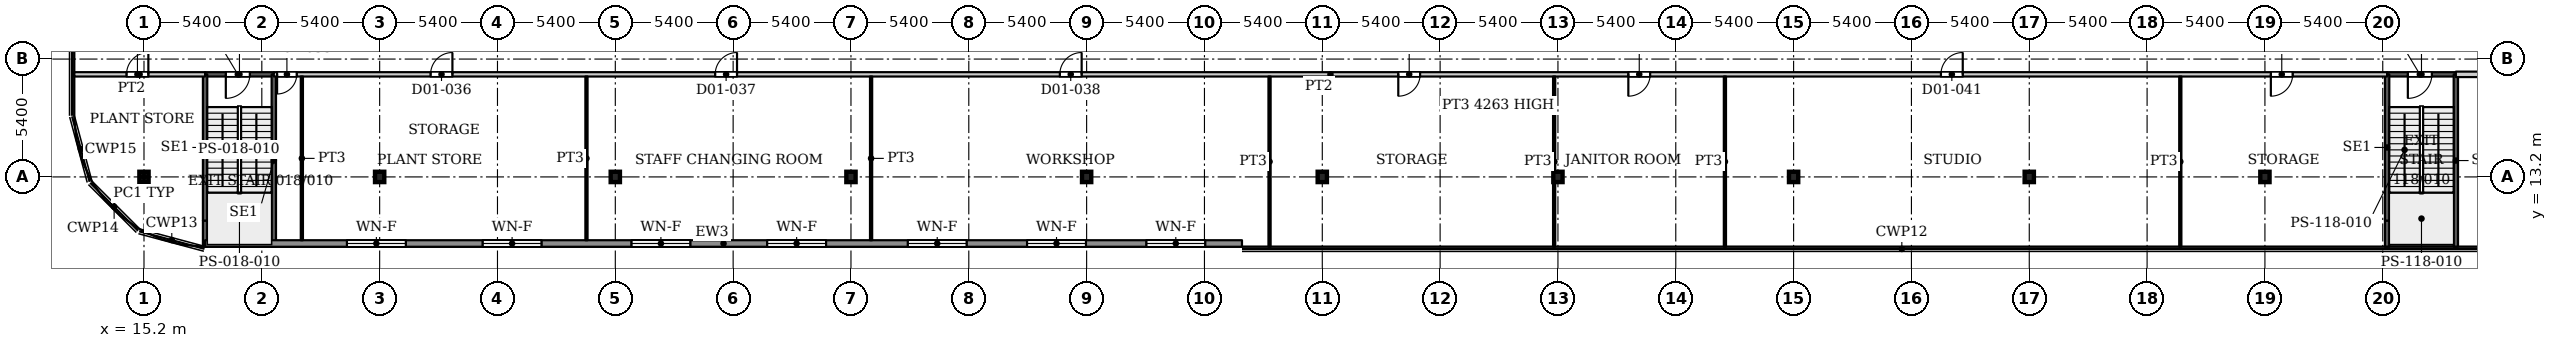
"""IFC4 building model, lengths in metres.
Left out: names, types, materials, properties, quantities, classifications, styles, units other than length and angle.
Written with IfcOpenShell. Run it as: python <this file> out.ifc"""

import sys

from ifc_helpers import new_model, si_unit, direction, frame, frame_2d, origin, origin_2d, place, context, subcontext, project, spatial, rectangle, i_section, extrude, source, transform, mapped, element, fill, save


model = new_model("IFC4")
c1 = context("Model", 3, precision=1e-05, world=origin(), true_north=direction((0.0, 1.0)))
c2 = subcontext(c1, "Body", "Model", "MODEL_VIEW")
j1 = project(units=[si_unit("LENGTHUNIT", "METRE"), si_unit("PLANEANGLEUNIT", "RADIAN")], contexts=[c1])
p1 = place(None, origin())
s1 = spatial("IfcSite", under=j1, at=p1, CompositionType="ELEMENT")
p2 = place(p1, origin())
s2 = spatial("IfcBuilding", under=s1, at=p2, CompositionType="ELEMENT")
p3 = place(p2, frame((0.0, 0.0, 7.5)))
s3 = spatial("IfcBuildingStorey", under=s2, at=p3, CompositionType="ELEMENT", Elevation=7.5)
for number, where, z_axis, x_axis in (
    (1, (15.2, 13.2, 0.0), (0.0, 0.0, 1.0), (1.0, 0.0, 0.0)),
    (2, (26.0, 13.2, 0.0), (0.0, 0.0, 1.0), (1.0, 0.0, 0.0)),
    (3, (36.8, 13.2, 0.0), (0.0, 0.0, 1.0), (1.0, 0.0, 0.0)),
    (4, (47.6, 13.2, 0.0), (0.0, 0.0, 1.0), (1.0, 0.0, 0.0)),
    (5, (58.4, 13.2, 0.0), (0.0, 0.0, 1.0), (1.0, 0.0, 0.0)),
    (6, (69.2, 13.2, 0.0), (0.0, 0.0, 1.0), (1.0, 0.0, 0.0)),
    (7, (80.0, 13.2, 0.0), (0.0, 0.0, 1.0), (1.0, 0.0, 0.0)),
    (8, (90.8, 13.2, 0.0), (0.0, 0.0, 1.0), (1.0, 0.0, 0.0)),
    (9, (101.6, 13.2, 0.0), (0.0, 0.0, 1.0), (1.0, 0.0, 0.0)),
    (10, (112.4, 13.2, 0.0), (0.0, 0.0, 1.0), (1.0, 0.0, 0.0)),
):
    element("IfcColumn", number, at=place(p3, frame(where, z_axis=z_axis, x_axis=x_axis)), inside=s3, PredefinedType="COLUMN", context=c2, shape_type="SweptSolid", body=[
        extrude(i_section(OverallWidth=0.424, OverallDepth=0.474, WebThickness=0.048, FlangeThickness=0.077, FilletRadius=0.014, at=origin_2d()), origin(), (0.0, 0.0, 1.0), 5.0),
    ])
p4 = place(p3, frame((65.52, 10.15, 0.0), z_axis=(0.0, 0.0, 1.0), x_axis=(-1.0, 0.0, 0.0)))
e11 = element("IfcWall", 11, at=p4, inside=s3, PredefinedType="SOLIDWALL", context=c2, shape_type="SweptSolid", body=[
    extrude(rectangle(XDim=47.52, YDim=0.3, at=frame_2d((23.76, 0.0))), origin(), (0.0, 0.0, 1.0), 4.75),
])
p5 = place(p4, frame((1.683, 0.0, 0.6)))
e12 = element("IfcOpeningElement", 12, at=p5, cuts=e11, PredefinedType="OPENING", context=c2, shape_type="SweptSolid", body=[
    extrude(rectangle(XDim=2.7, YDim=3.0, at=frame_2d((1.35, 1.5))), frame((0.0, 0.16, 0.0), z_axis=(0.0, -1.0, 0.0), x_axis=(1.0, 0.0, 0.0)), (0.0, 0.0, 1.0), 0.32),
])
p6 = place(p4, frame((7.15, 0.0, 0.6)))
e13 = element("IfcOpeningElement", 13, at=p6, cuts=e11, PredefinedType="OPENING", context=c2, shape_type="SweptSolid", body=[
    extrude(rectangle(XDim=2.7, YDim=3.0, at=frame_2d((1.35, 1.5))), frame((0.0, 0.16, 0.0), z_axis=(0.0, -1.0, 0.0), x_axis=(1.0, 0.0, 0.0)), (0.0, 0.0, 1.0), 0.32),
])
p7 = place(p4, frame((12.617, 0.0, 0.6)))
e14 = element("IfcOpeningElement", 14, at=p7, cuts=e11, PredefinedType="OPENING", context=c2, shape_type="SweptSolid", body=[
    extrude(rectangle(XDim=2.7, YDim=3.0, at=frame_2d((1.35, 1.5))), frame((0.0, 0.16, 0.0), z_axis=(0.0, -1.0, 0.0), x_axis=(1.0, 0.0, 0.0)), (0.0, 0.0, 1.0), 0.32),
])
p8 = place(p4, frame((19.06, 0.0, 0.6)))
e15 = element("IfcOpeningElement", 15, at=p8, cuts=e11, PredefinedType="OPENING", context=c2, shape_type="SweptSolid", body=[
    extrude(rectangle(XDim=2.7, YDim=3.0, at=frame_2d((1.35, 1.5))), frame((0.0, 0.16, 0.0), z_axis=(0.0, -1.0, 0.0), x_axis=(1.0, 0.0, 0.0)), (0.0, 0.0, 1.0), 0.32),
])
p9 = place(p4, frame((25.28, 0.0, 0.6)))
e16 = element("IfcOpeningElement", 16, at=p9, cuts=e11, PredefinedType="OPENING", context=c2, shape_type="SweptSolid", body=[
    extrude(rectangle(XDim=2.7, YDim=3.0, at=frame_2d((1.35, 1.5))), frame((0.0, 0.16, 0.0), z_axis=(0.0, -1.0, 0.0), x_axis=(1.0, 0.0, 0.0)), (0.0, 0.0, 1.0), 0.32),
])
p10 = place(p4, frame((32.1, 0.0, 0.6)))
e17 = element("IfcOpeningElement", 17, at=p10, cuts=e11, PredefinedType="OPENING", context=c2, shape_type="SweptSolid", body=[
    extrude(rectangle(XDim=2.7, YDim=3.0, at=frame_2d((1.35, 1.5))), frame((0.0, 0.16, 0.0), z_axis=(0.0, -1.0, 0.0), x_axis=(1.0, 0.0, 0.0)), (0.0, 0.0, 1.0), 0.32),
])
p11 = place(p4, frame((38.32, 0.0, 0.6)))
e18 = element("IfcOpeningElement", 18, at=p11, cuts=e11, PredefinedType="OPENING", context=c2, shape_type="SweptSolid", body=[
    extrude(rectangle(XDim=2.7, YDim=3.0, at=frame_2d((1.35, 1.5))), frame((0.0, 0.16, 0.0), z_axis=(0.0, -1.0, 0.0), x_axis=(1.0, 0.0, 0.0)), (0.0, 0.0, 1.0), 0.32),
])
p12 = place(p3, frame((18.0, 17.9, 0.0), z_axis=(0.0, 0.0, 1.0), x_axis=(1.0, 0.0, 0.0)))
e19 = element("IfcWall", 19, at=p12, inside=s3, PredefinedType="SHEAR", context=c2, shape_type="SweptSolid", body=[
    extrude(rectangle(XDim=3.15, YDim=0.2, at=frame_2d((1.575, 0.0))), origin(), (0.0, 0.0, 1.0), 5.0),
])
p13 = place(p12, frame((0.95, 0.0, 0.0)))
e20 = element("IfcOpeningElement", 20, at=p13, cuts=e19, PredefinedType="OPENING", context=c2, shape_type="SweptSolid", body=[
    extrude(rectangle(XDim=1.1, YDim=2.2, at=frame_2d((0.55, 1.1))), frame((0.0, 0.11, 0.0), z_axis=(0.0, -1.0, 0.0), x_axis=(1.0, 0.0, 0.0)), (0.0, 0.0, 1.0), 0.22),
])
p14 = place(p3, frame((18.0, 10.0, 0.0), z_axis=(0.0, 0.0, 1.0), x_axis=(0.0, 1.0, 0.0)))
e21 = element("IfcWall", 21, at=p14, inside=s3, PredefinedType="SHEAR", context=c2, shape_type="SweptSolid", body=[
    extrude(rectangle(XDim=1.2, YDim=0.2, at=frame_2d((0.6, 0.0))), origin(), (0.0, 0.0, 1.0), 5.0),
])
p15 = place(p3, frame((18.0, 11.2, 0.0), z_axis=(0.0, 0.0, 1.0), x_axis=(0.0, 1.0, 0.0)))
e22 = element("IfcWall", 22, at=p15, inside=s3, PredefinedType="SHEAR", context=c2, shape_type="SweptSolid", body=[
    extrude(rectangle(XDim=6.7, YDim=0.2, at=frame_2d((3.35, 0.0))), origin(), (0.0, 0.0, 1.0), 5.0),
])
p16 = place(p3, frame((21.15, 10.0, 0.0), z_axis=(0.0, 0.0, 1.0), x_axis=(0.0, 1.0, 0.0)))
e23 = element("IfcWall", 23, at=p16, inside=s3, PredefinedType="SHEAR", context=c2, shape_type="SweptSolid", body=[
    extrude(rectangle(XDim=7.9, YDim=0.2, at=frame_2d((3.95, 0.0))), origin(), (0.0, 0.0, 1.0), 5.0),
])
p17 = place(p3, frame((118.0, 17.9, 0.0), z_axis=(0.0, 0.0, 1.0), x_axis=(1.0, 0.0, 0.0)))
e24 = element("IfcWall", 24, at=p17, inside=s3, PredefinedType="SHEAR", context=c2, shape_type="SweptSolid", body=[
    extrude(rectangle(XDim=3.15, YDim=0.2, at=frame_2d((1.575, 0.0))), origin(), (0.0, 0.0, 1.0), 5.0),
])
p18 = place(p17, frame((0.95, 0.0, 0.0)))
e25 = element("IfcOpeningElement", 25, at=p18, cuts=e24, PredefinedType="OPENING", context=c2, shape_type="SweptSolid", body=[
    extrude(rectangle(XDim=1.1, YDim=2.2, at=frame_2d((0.55, 1.1))), frame((0.0, 0.11, 0.0), z_axis=(0.0, -1.0, 0.0), x_axis=(1.0, 0.0, 0.0)), (0.0, 0.0, 1.0), 0.22),
])
p19 = place(p3, frame((118.0, 10.0, 0.0), z_axis=(0.0, 0.0, 1.0), x_axis=(0.0, 1.0, 0.0)))
e26 = element("IfcWall", 26, at=p19, inside=s3, PredefinedType="SHEAR", context=c2, shape_type="SweptSolid", body=[
    extrude(rectangle(XDim=1.2, YDim=0.2, at=frame_2d((0.6, 0.0))), origin(), (0.0, 0.0, 1.0), 5.0),
])
p20 = place(p3, frame((118.0, 11.2, 0.0), z_axis=(0.0, 0.0, 1.0), x_axis=(0.0, 1.0, 0.0)))
e27 = element("IfcWall", 27, at=p20, inside=s3, PredefinedType="SHEAR", context=c2, shape_type="SweptSolid", body=[
    extrude(rectangle(XDim=6.7, YDim=0.2, at=frame_2d((3.35, 0.0))), origin(), (0.0, 0.0, 1.0), 5.0),
])
p21 = place(p3, frame((121.15, 10.0, 0.0), z_axis=(0.0, 0.0, 1.0), x_axis=(0.0, 1.0, 0.0)))
e28 = element("IfcWall", 28, at=p21, inside=s3, PredefinedType="SHEAR", context=c2, shape_type="SweptSolid", body=[
    extrude(rectangle(XDim=7.9, YDim=0.2, at=frame_2d((3.95, 0.0))), origin(), (0.0, 0.0, 1.0), 5.0),
])
p22 = place(p3, frame((12.0, 17.9, 0.0), z_axis=(0.0, 0.0, 1.0), x_axis=(1.0, 0.0, 0.0)))
e29 = element("IfcWall", 29, at=p22, inside=s3, PredefinedType="PARTITIONING", context=c2, shape_type="SweptSolid", body=[
    extrude(rectangle(XDim=6.0, YDim=0.2, at=frame_2d((3.0, 0.0))), origin(), (0.0, 0.0, 1.0), 4.68),
])
p23 = place(p22, frame((2.4, 0.0, 0.0)))
e30 = element("IfcOpeningElement", 30, at=p23, cuts=e29, PredefinedType="OPENING", context=c2, shape_type="SweptSolid", body=[
    extrude(rectangle(XDim=1.0, YDim=2.1, at=frame_2d((0.5, 1.05))), frame((0.0, 0.11, 0.0), z_axis=(0.0, -1.0, 0.0), x_axis=(1.0, 0.0, 0.0)), (0.0, 0.0, 1.0), 0.22),
])
p24 = place(p3, frame((21.15, 17.9, 0.0), z_axis=(0.0, 0.0, 1.0), x_axis=(1.0, 0.0, 0.0)))
e31 = element("IfcWall", 31, at=p24, inside=s3, PredefinedType="PARTITIONING", context=c2, shape_type="SweptSolid", body=[
    extrude(rectangle(XDim=96.85, YDim=0.2, at=frame_2d((48.425, 0.0))), origin(), (0.0, 0.0, 1.0), 4.68),
])
p25 = place(p24, frame((0.15, 0.0, 0.0)))
e32 = element("IfcOpeningElement", 32, at=p25, cuts=e31, PredefinedType="OPENING", context=c2, shape_type="SweptSolid", body=[
    extrude(rectangle(XDim=0.9, YDim=2.1, at=frame_2d((0.45, 1.05))), frame((0.0, 0.11, 0.0), z_axis=(0.0, -1.0, 0.0), x_axis=(1.0, 0.0, 0.0)), (0.0, 0.0, 1.0), 0.22),
])
p26 = place(p24, frame((7.185, 0.0, 0.0)))
e33 = element("IfcOpeningElement", 33, at=p26, cuts=e31, PredefinedType="OPENING", context=c2, shape_type="SweptSolid", body=[
    extrude(rectangle(XDim=1.0, YDim=2.1, at=frame_2d((0.5, 1.05))), frame((0.0, 0.11, 0.0), z_axis=(0.0, -1.0, 0.0), x_axis=(1.0, 0.0, 0.0)), (0.0, 0.0, 1.0), 0.22),
])
p27 = place(p24, frame((20.228, 0.0, 0.0)))
e34 = element("IfcOpeningElement", 34, at=p27, cuts=e31, PredefinedType="OPENING", context=c2, shape_type="SweptSolid", body=[
    extrude(rectangle(XDim=1.0, YDim=2.1, at=frame_2d((0.5, 1.05))), frame((0.0, 0.11, 0.0), z_axis=(0.0, -1.0, 0.0), x_axis=(1.0, 0.0, 0.0)), (0.0, 0.0, 1.0), 0.22),
])
p28 = place(p24, frame((36.022, 0.0, 0.0)))
e35 = element("IfcOpeningElement", 35, at=p28, cuts=e31, PredefinedType="OPENING", context=c2, shape_type="SweptSolid", body=[
    extrude(rectangle(XDim=1.0, YDim=2.1, at=frame_2d((0.5, 1.05))), frame((0.0, 0.11, 0.0), z_axis=(0.0, -1.0, 0.0), x_axis=(1.0, 0.0, 0.0)), (0.0, 0.0, 1.0), 0.22),
])
p29 = place(p24, frame((51.533, 0.0, 0.0)))
e36 = element("IfcOpeningElement", 36, at=p29, cuts=e31, PredefinedType="OPENING", context=c2, shape_type="SweptSolid", body=[
    extrude(rectangle(XDim=1.0, YDim=2.1, at=frame_2d((0.5, 1.05))), frame((0.0, 0.11, 0.0), z_axis=(0.0, -1.0, 0.0), x_axis=(1.0, 0.0, 0.0)), (0.0, 0.0, 1.0), 0.22),
])
p30 = place(p24, frame((62.076, 0.0, 0.0)))
e37 = element("IfcOpeningElement", 37, at=p30, cuts=e31, PredefinedType="OPENING", context=c2, shape_type="SweptSolid", body=[
    extrude(rectangle(XDim=1.0, YDim=2.1, at=frame_2d((0.5, 1.05))), frame((0.0, 0.11, 0.0), z_axis=(0.0, -1.0, 0.0), x_axis=(1.0, 0.0, 0.0)), (0.0, 0.0, 1.0), 0.22),
])
p31 = place(p24, frame((76.402, 0.0, 0.0)))
e38 = element("IfcOpeningElement", 38, at=p31, cuts=e31, PredefinedType="OPENING", context=c2, shape_type="SweptSolid", body=[
    extrude(rectangle(XDim=1.0, YDim=2.1, at=frame_2d((0.5, 1.05))), frame((0.0, 0.11, 0.0), z_axis=(0.0, -1.0, 0.0), x_axis=(1.0, 0.0, 0.0)), (0.0, 0.0, 1.0), 0.22),
])
p32 = place(p24, frame((91.522, 0.0, 0.0)))
e39 = element("IfcOpeningElement", 39, at=p32, cuts=e31, PredefinedType="OPENING", context=c2, shape_type="SweptSolid", body=[
    extrude(rectangle(XDim=1.0, YDim=2.1, at=frame_2d((0.5, 1.05))), frame((0.0, 0.11, 0.0), z_axis=(0.0, -1.0, 0.0), x_axis=(1.0, 0.0, 0.0)), (0.0, 0.0, 1.0), 0.22),
])
for number, where, z_axis, x_axis in (
    (40, (22.435, 10.299, 0.0), (0.0, 0.0, 1.0), (0.0, 1.0, 0.0)),
    (41, (35.478, 10.299, 0.0), (0.0, 0.0, 1.0), (0.0, 1.0, 0.0)),
    (42, (48.522, 10.299, 0.0), (0.0, 0.0, 1.0), (0.0, 1.0, 0.0)),
):
    element("IfcWall", number, at=place(p3, frame(where, z_axis=z_axis, x_axis=x_axis)), inside=s3, PredefinedType="PARTITIONING", context=c2, shape_type="SweptSolid", body=[
        extrude(rectangle(XDim=7.501, YDim=0.1, at=frame_2d((3.75, 0.0))), origin(), (0.0, 0.0, 1.0), 4.68),
    ])
p33 = place(p3, frame((66.783, 10.0, 0.0), z_axis=(0.0, 0.0, 1.0), x_axis=(0.0, 1.0, 0.0)))
e43 = element("IfcWall", 43, at=p33, inside=s3, PredefinedType="PARTITIONING", context=c2, shape_type="SweptSolid", body=[
    extrude(rectangle(XDim=7.8, YDim=0.1, at=frame_2d((3.9, 0.0))), origin(), (0.0, 0.0, 1.0), 4.68),
])
p34 = place(p3, frame((79.826, 10.0, 0.0), z_axis=(0.0, 0.0, 1.0), x_axis=(0.0, 1.0, 0.0)))
e44 = element("IfcWall", 44, at=p34, inside=s3, PredefinedType="PARTITIONING", context=c2, shape_type="SweptSolid", body=[
    extrude(rectangle(XDim=7.8, YDim=0.1, at=frame_2d((3.9, 0.0))), origin(), (0.0, 0.0, 1.0), 4.263),
])
for number, where, z_axis, x_axis in (
    (45, (87.652, 10.0, 0.0), (0.0, 0.0, 1.0), (0.0, 1.0, 0.0)),
    (46, (108.522, 10.0, 0.0), (0.0, 0.0, 1.0), (0.0, 1.0, 0.0)),
):
    element("IfcWall", number, at=place(p3, frame(where, z_axis=z_axis, x_axis=x_axis)), inside=s3, PredefinedType="PARTITIONING", context=c2, shape_type="SweptSolid", body=[
        extrude(rectangle(XDim=7.8, YDim=0.1, at=frame_2d((3.9, 0.0))), origin(), (0.0, 0.0, 1.0), 4.68),
    ])
p35 = place(p3, frame((121.15, 17.9, 0.0), z_axis=(0.0, 0.0, 1.0), x_axis=(1.0, 0.0, 0.0)))
e47 = element("IfcWall", 47, at=p35, inside=s3, PredefinedType="PARTITIONING", context=c2, shape_type="SweptSolid", body=[
    extrude(rectangle(XDim=10.551, YDim=0.25, at=frame_2d((5.275, 0.0))), origin(), (0.0, 0.0, 1.0), 4.68),
])
p36 = place(p35, frame((5.065, 0.0, 0.0)))
e48 = element("IfcOpeningElement", 48, at=p36, cuts=e47, PredefinedType="OPENING", context=c2, shape_type="SweptSolid", body=[
    extrude(rectangle(XDim=1.0, YDim=2.1, at=frame_2d((0.5, 1.05))), frame((0.0, 0.135, 0.0), z_axis=(0.0, -1.0, 0.0), x_axis=(1.0, 0.0, 0.0)), (0.0, 0.0, 1.0), 0.27),
])
m1 = source(origin(), c2, "Body", "SweptSolid", [
    extrude(rectangle(XDim=2.7, YDim=3.0, at=frame_2d((1.35, 1.5))), frame((0.0, 0.03, 0.0), z_axis=(0.0, -1.0, 0.0), x_axis=(1.0, 0.0, 0.0)), (0.0, 0.0, 1.0), 0.06),
])
p37 = place(p5, origin())
e49 = element("IfcWindow", 49, at=p37, inside=s3, PartitioningType="SINGLE_PANEL", PredefinedType="WINDOW", context=c2, shape_type="MappedRepresentation", body=[
    mapped(m1, transform((0.0, 0.0, 0.0), x_axis=(1.0, 0.0, 0.0), y_axis=(0.0, 1.0, 0.0), z_axis=(0.0, 0.0, 1.0), scale=1.0)),
])
fill(e12, e49)
p38 = place(p6, origin())
e50 = element("IfcWindow", 50, at=p38, inside=s3, PartitioningType="SINGLE_PANEL", PredefinedType="WINDOW", context=c2, shape_type="MappedRepresentation", body=[
    mapped(m1, transform((0.0, 0.0, 0.0), x_axis=(1.0, 0.0, 0.0), y_axis=(0.0, 1.0, 0.0), z_axis=(0.0, 0.0, 1.0), scale=1.0)),
])
fill(e13, e50)
p39 = place(p7, origin())
e51 = element("IfcWindow", 51, at=p39, inside=s3, PartitioningType="SINGLE_PANEL", PredefinedType="WINDOW", context=c2, shape_type="MappedRepresentation", body=[
    mapped(m1, transform((0.0, 0.0, 0.0), x_axis=(1.0, 0.0, 0.0), y_axis=(0.0, 1.0, 0.0), z_axis=(0.0, 0.0, 1.0), scale=1.0)),
])
fill(e14, e51)
p40 = place(p8, origin())
e52 = element("IfcWindow", 52, at=p40, inside=s3, PartitioningType="SINGLE_PANEL", PredefinedType="WINDOW", context=c2, shape_type="MappedRepresentation", body=[
    mapped(m1, transform((0.0, 0.0, 0.0), x_axis=(1.0, 0.0, 0.0), y_axis=(0.0, 1.0, 0.0), z_axis=(0.0, 0.0, 1.0), scale=1.0)),
])
fill(e15, e52)
p41 = place(p9, origin())
e53 = element("IfcWindow", 53, at=p41, inside=s3, PartitioningType="SINGLE_PANEL", PredefinedType="WINDOW", context=c2, shape_type="MappedRepresentation", body=[
    mapped(m1, transform((0.0, 0.0, 0.0), x_axis=(1.0, 0.0, 0.0), y_axis=(0.0, 1.0, 0.0), z_axis=(0.0, 0.0, 1.0), scale=1.0)),
])
fill(e16, e53)
p42 = place(p10, origin())
e54 = element("IfcWindow", 54, at=p42, inside=s3, PartitioningType="SINGLE_PANEL", PredefinedType="WINDOW", context=c2, shape_type="MappedRepresentation", body=[
    mapped(m1, transform((0.0, 0.0, 0.0), x_axis=(1.0, 0.0, 0.0), y_axis=(0.0, 1.0, 0.0), z_axis=(0.0, 0.0, 1.0), scale=1.0)),
])
fill(e17, e54)
p43 = place(p11, origin())
e55 = element("IfcWindow", 55, at=p43, inside=s3, PartitioningType="SINGLE_PANEL", PredefinedType="WINDOW", context=c2, shape_type="MappedRepresentation", body=[
    mapped(m1, transform((0.0, 0.0, 0.0), x_axis=(1.0, 0.0, 0.0), y_axis=(0.0, 1.0, 0.0), z_axis=(0.0, 0.0, 1.0), scale=1.0)),
])
fill(e18, e55)
m2 = source(origin(), c2, "Body", "SweptSolid", [
    extrude(rectangle(XDim=1.1, YDim=2.2, at=frame_2d((0.55, 1.1))), frame((0.0, 0.025, 0.0), z_axis=(0.0, -1.0, 0.0), x_axis=(1.0, 0.0, 0.0)), (0.0, 0.0, 1.0), 0.05),
])
p44 = place(p13, origin())
e56 = element("IfcDoor", 56, at=p44, inside=s3, OperationType="SINGLE_SWING_RIGHT", PredefinedType="DOOR", context=c2, shape_type="MappedRepresentation", body=[
    mapped(m2, transform((0.0, 0.0, 0.0), x_axis=(1.0, 0.0, 0.0), y_axis=(0.0, 1.0, 0.0), z_axis=(0.0, 0.0, 1.0), scale=1.0)),
])
fill(e20, e56)
p45 = place(p18, origin())
e57 = element("IfcDoor", 57, at=p45, inside=s3, OperationType="SINGLE_SWING_RIGHT", PredefinedType="DOOR", context=c2, shape_type="MappedRepresentation", body=[
    mapped(m2, transform((0.0, 0.0, 0.0), x_axis=(1.0, 0.0, 0.0), y_axis=(0.0, 1.0, 0.0), z_axis=(0.0, 0.0, 1.0), scale=1.0)),
])
fill(e25, e57)
m3 = source(origin(), c2, "Body", "SweptSolid", [
    extrude(rectangle(XDim=1.0, YDim=2.1, at=frame_2d((0.5, 1.05))), frame((0.0, 0.025, 0.0), z_axis=(0.0, -1.0, 0.0), x_axis=(1.0, 0.0, 0.0)), (0.0, 0.0, 1.0), 0.05),
])
p46 = place(p23, origin())
e58 = element("IfcDoor", 58, at=p46, inside=s3, OperationType="SINGLE_SWING_LEFT", PredefinedType="DOOR", context=c2, shape_type="MappedRepresentation", body=[
    mapped(m3, transform((0.0, 0.0, 0.0), x_axis=(1.0, 0.0, 0.0), y_axis=(0.0, 1.0, 0.0), z_axis=(0.0, 0.0, 1.0), scale=1.0)),
])
fill(e30, e58)
m4 = source(origin(), c2, "Body", "SweptSolid", [
    extrude(rectangle(XDim=0.9, YDim=2.1, at=frame_2d((0.45, 1.05))), frame((0.0, 0.025, 0.0), z_axis=(0.0, -1.0, 0.0), x_axis=(1.0, 0.0, 0.0)), (0.0, 0.0, 1.0), 0.05),
])
p47 = place(p25, origin())
e59 = element("IfcDoor", 59, at=p47, inside=s3, OperationType="SINGLE_SWING_RIGHT", PredefinedType="DOOR", context=c2, shape_type="MappedRepresentation", body=[
    mapped(m4, transform((0.0, 0.0, 0.0), x_axis=(1.0, 0.0, 0.0), y_axis=(0.0, 1.0, 0.0), z_axis=(0.0, 0.0, 1.0), scale=1.0)),
])
fill(e32, e59)
p48 = place(p26, origin())
e60 = element("IfcDoor", 60, at=p48, inside=s3, OperationType="SINGLE_SWING_LEFT", PredefinedType="DOOR", context=c2, shape_type="MappedRepresentation", body=[
    mapped(m3, transform((0.0, 0.0, 0.0), x_axis=(1.0, 0.0, 0.0), y_axis=(0.0, 1.0, 0.0), z_axis=(0.0, 0.0, 1.0), scale=1.0)),
])
fill(e33, e60)
p49 = place(p27, origin())
e61 = element("IfcDoor", 61, at=p49, inside=s3, OperationType="SINGLE_SWING_LEFT", PredefinedType="DOOR", context=c2, shape_type="MappedRepresentation", body=[
    mapped(m3, transform((0.0, 0.0, 0.0), x_axis=(1.0, 0.0, 0.0), y_axis=(0.0, 1.0, 0.0), z_axis=(0.0, 0.0, 1.0), scale=1.0)),
])
fill(e34, e61)
p50 = place(p28, origin())
e62 = element("IfcDoor", 62, at=p50, inside=s3, OperationType="SINGLE_SWING_LEFT", PredefinedType="DOOR", context=c2, shape_type="MappedRepresentation", body=[
    mapped(m3, transform((0.0, 0.0, 0.0), x_axis=(1.0, 0.0, 0.0), y_axis=(0.0, 1.0, 0.0), z_axis=(0.0, 0.0, 1.0), scale=1.0)),
])
fill(e35, e62)
p51 = place(p29, origin())
e63 = element("IfcDoor", 63, at=p51, inside=s3, OperationType="SINGLE_SWING_RIGHT", PredefinedType="DOOR", context=c2, shape_type="MappedRepresentation", body=[
    mapped(m3, transform((0.0, 0.0, 0.0), x_axis=(1.0, 0.0, 0.0), y_axis=(0.0, 1.0, 0.0), z_axis=(0.0, 0.0, 1.0), scale=1.0)),
])
fill(e36, e63)
p52 = place(p30, origin())
e64 = element("IfcDoor", 64, at=p52, inside=s3, OperationType="SINGLE_SWING_RIGHT", PredefinedType="DOOR", context=c2, shape_type="MappedRepresentation", body=[
    mapped(m3, transform((0.0, 0.0, 0.0), x_axis=(1.0, 0.0, 0.0), y_axis=(0.0, 1.0, 0.0), z_axis=(0.0, 0.0, 1.0), scale=1.0)),
])
fill(e37, e64)
p53 = place(p31, origin())
e65 = element("IfcDoor", 65, at=p53, inside=s3, OperationType="SINGLE_SWING_LEFT", PredefinedType="DOOR", context=c2, shape_type="MappedRepresentation", body=[
    mapped(m3, transform((0.0, 0.0, 0.0), x_axis=(1.0, 0.0, 0.0), y_axis=(0.0, 1.0, 0.0), z_axis=(0.0, 0.0, 1.0), scale=1.0)),
])
fill(e38, e65)
p54 = place(p32, origin())
e66 = element("IfcDoor", 66, at=p54, inside=s3, OperationType="SINGLE_SWING_RIGHT", PredefinedType="DOOR", context=c2, shape_type="MappedRepresentation", body=[
    mapped(m3, transform((0.0, 0.0, 0.0), x_axis=(1.0, 0.0, 0.0), y_axis=(0.0, 1.0, 0.0), z_axis=(0.0, 0.0, 1.0), scale=1.0)),
])
fill(e39, e66)
save(model, sys.argv[1])
